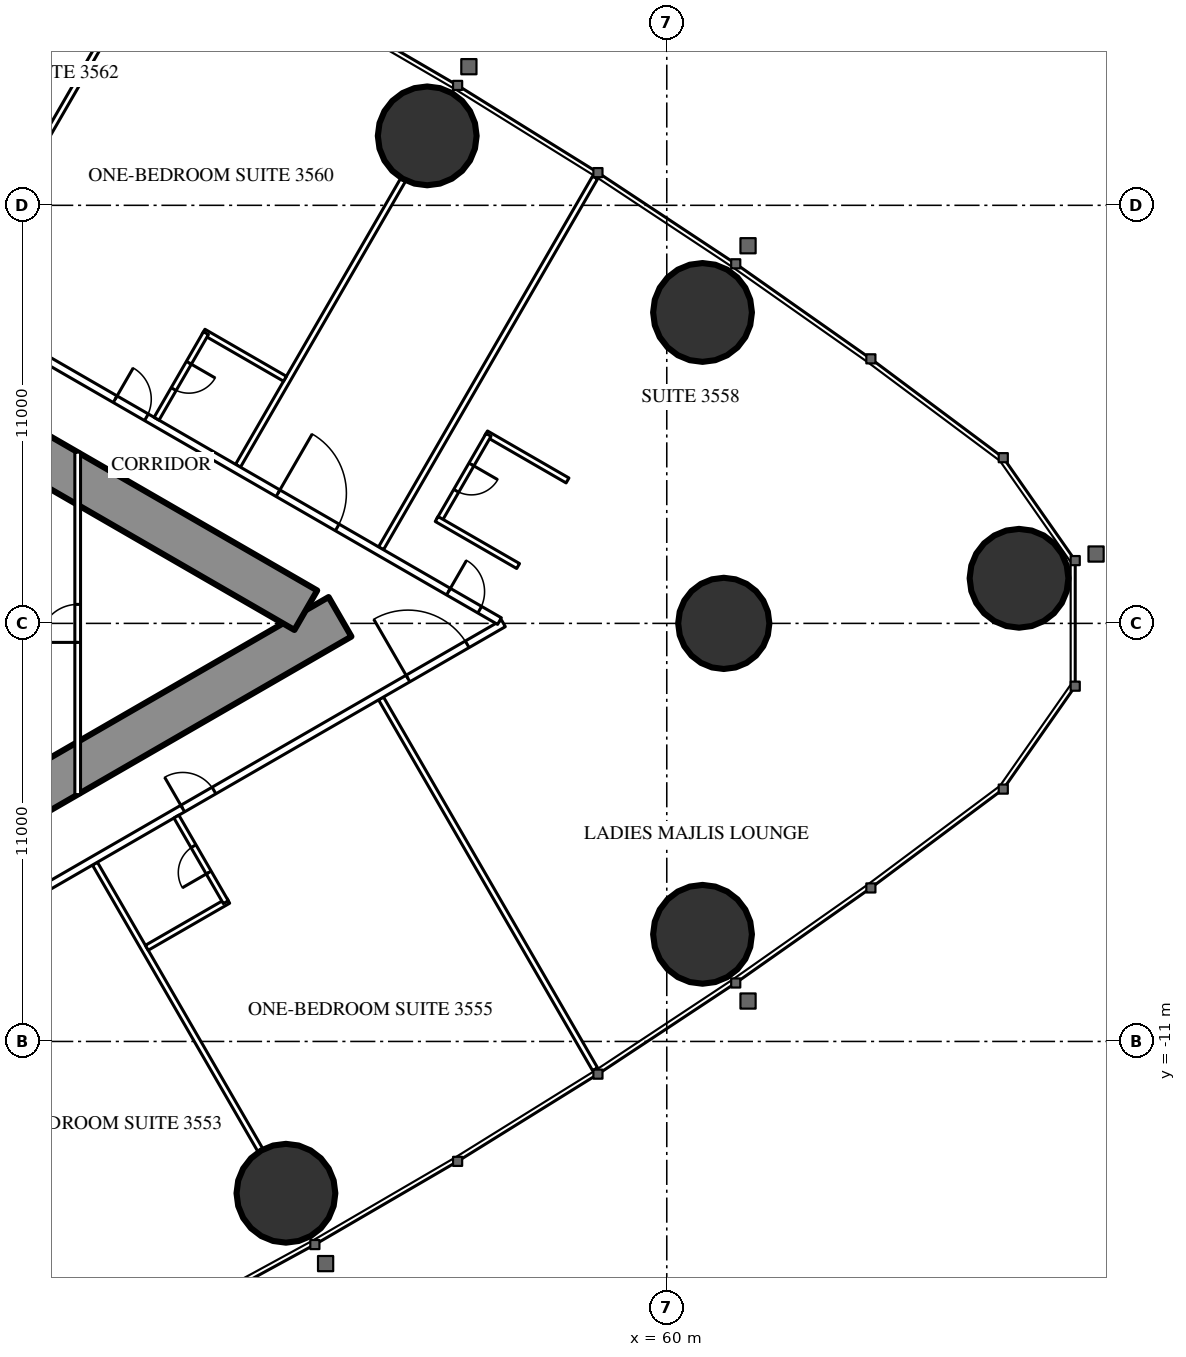
"""IFC4 building model, lengths in metres.
Left out: names, types, materials, properties, quantities, classifications, styles, units other than length and angle.
Written with IfcOpenShell. Run it as: python <this file> out.ifc"""

import sys

from ifc_helpers import new_model, si_unit, direction, frame, frame_2d, origin, origin_2d, place, context, subcontext, project, spatial, rectangle, circle, hollow_circle, extrude, element, fill, save


model = new_model("IFC4")
c1 = context("Model", 3, precision=1e-05, world=origin(), true_north=direction((0.0, 1.0)))
c2 = subcontext(c1, "Body", "Model", "MODEL_VIEW")
j1 = project(units=[si_unit("LENGTHUNIT", "METRE"), si_unit("PLANEANGLEUNIT", "RADIAN")], contexts=[c1])
p1 = place(None, origin())
s1 = spatial("IfcSite", under=j1, at=p1, CompositionType="ELEMENT")
p2 = place(p1, origin())
s2 = spatial("IfcBuilding", under=s1, at=p2, CompositionType="ELEMENT")
p3 = place(p2, frame((0.0, 0.0, 132.6)))
s3 = spatial("IfcBuildingStorey", under=s2, at=p3, CompositionType="ELEMENT", Elevation=132.6)
for number, where, z_axis, x_axis in (
    (1, (69.269, 1.187, 0.0), (0.0, 0.0, 1.0), (1.0, 0.0, 0.0)),
    (2, (60.941, 8.181, 0.0), (0.0, 0.0, 1.0), (1.0, 0.0, 0.0)),
    (3, (53.697, 12.827, 0.0), (0.0, 0.0, 1.0), (1.0, 0.0, 0.0)),
    (4, (49.979, -14.994, 0.0), (0.0, 0.0, 1.0), (1.0, 0.0, 0.0)),
    (5, (60.941, -8.181, 0.0), (0.0, 0.0, 1.0), (1.0, 0.0, 0.0)),
):
    element("IfcColumn", number, at=place(p3, frame(where, z_axis=z_axis, x_axis=x_axis)), inside=s3, PredefinedType="COLUMN", context=c2, shape_type="SweptSolid", body=[
        extrude(hollow_circle(Radius=1.3, WallThickness=0.1, at=origin_2d()), origin(), (0.0, 0.0, 1.0), 3.5),
    ])
p4 = place(p3, frame((61.5, 0.0, 0.0), z_axis=(0.0, 0.0, 1.0), x_axis=(1.0, 0.0, 0.0)))
e6 = element("IfcColumn", 6, at=p4, inside=s3, PredefinedType="COLUMN", context=c2, shape_type="SweptSolid", body=[
    extrude(circle(Radius=1.2, at=origin_2d()), origin(), (0.0, 0.0, 1.0), 3.5),
])
p5 = place(p3, frame((27.2, -13.8, 0.0), z_axis=(0.0, 0.0, 1.0), x_axis=(0.866027159892, 0.499996958321, 0.0)))
e7 = element("IfcWall", 7, at=p5, inside=s3, PredefinedType="SHEAR", context=c2, shape_type="SweptSolid", body=[
    extrude(rectangle(XDim=27.947, YDim=1.2, at=frame_2d((13.973, 0.0))), origin(), (0.0, 0.0, 1.0), 3.5),
])
p6 = place(p5, frame((4.6, 0.0, 0.0)))
e8 = element("IfcOpeningElement", 8, at=p6, cuts=e7, PredefinedType="OPENING", context=c2, shape_type="SweptSolid", body=[
    extrude(rectangle(XDim=1.0, YDim=2.2, at=frame_2d((0.5, 1.1))), frame((0.0, 0.61, 0.0), z_axis=(0.0, -1.0, 0.0), x_axis=(1.0, 0.0, 0.0)), (0.0, 0.0, 1.0), 1.22),
])
p7 = place(p5, frame((13.395, 0.0, 0.0)))
e9 = element("IfcOpeningElement", 9, at=p7, cuts=e7, PredefinedType="OPENING", context=c2, shape_type="SweptSolid", body=[
    extrude(rectangle(XDim=1.8, YDim=2.2, at=frame_2d((0.9, 1.1))), frame((0.0, 0.61, 0.0), z_axis=(0.0, -1.0, 0.0), x_axis=(1.0, 0.0, 0.0)), (0.0, 0.0, 1.0), 1.22),
])
p8 = place(p3, frame((27.2, 13.8, 0.0), z_axis=(0.0, 0.0, 1.0), x_axis=(0.866024515034, -0.500001539357, 0.0)))
e10 = element("IfcWall", 10, at=p8, inside=s3, PredefinedType="SHEAR", context=c2, shape_type="SweptSolid", body=[
    extrude(rectangle(XDim=26.907, YDim=1.2, at=frame_2d((13.454, 0.0))), origin(), (0.0, 0.0, 1.0), 3.5),
])
p9 = place(p8, frame((4.6, 0.0, 0.0)))
e11 = element("IfcOpeningElement", 11, at=p9, cuts=e10, PredefinedType="OPENING", context=c2, shape_type="SweptSolid", body=[
    extrude(rectangle(XDim=1.0, YDim=2.2, at=frame_2d((0.5, 1.1))), frame((0.0, 0.61, 0.0), z_axis=(0.0, -1.0, 0.0), x_axis=(1.0, 0.0, 0.0)), (0.0, 0.0, 1.0), 1.22),
])
p10 = place(p8, frame((13.395, 0.0, 0.0)))
e12 = element("IfcOpeningElement", 12, at=p10, cuts=e10, PredefinedType="OPENING", context=c2, shape_type="SweptSolid", body=[
    extrude(rectangle(XDim=1.8, YDim=2.2, at=frame_2d((0.9, 1.1))), frame((0.0, 0.61, 0.0), z_axis=(0.0, -1.0, 0.0), x_axis=(1.0, 0.0, 0.0)), (0.0, 0.0, 1.0), 1.22),
])
p11 = place(p3, frame((44.954, -6.321, 0.0), z_axis=(0.0, 0.0, 1.0), x_axis=(0.500018676722, -0.866014620505, 0.0)))
e13 = element("IfcWall", 13, at=p11, inside=s3, PredefinedType="PARTITIONING", context=c2, shape_type="SweptSolid", body=[
    extrude(rectangle(XDim=8.704, YDim=0.15, at=frame_2d((4.352, 0.0))), origin(), (0.0, 0.0, 1.0), 2.2),
])
p12 = place(p3, frame((52.481, -1.975, 0.0), z_axis=(0.0, 0.0, 1.0), x_axis=(0.500003867771, -0.866023170714, 0.0)))
e14 = element("IfcWall", 14, at=p12, inside=s3, PredefinedType="PARTITIONING", context=c2, shape_type="SweptSolid", body=[
    extrude(rectangle(XDim=11.265, YDim=0.15, at=frame_2d((5.632, 0.0))), origin(), (0.0, 0.0, 1.0), 3.25),
])
p13 = place(p3, frame((41.19, 8.494, 0.0), z_axis=(0.0, 0.0, 1.0), x_axis=(0.49999258054, 0.866029687369, 0.0)))
e15 = element("IfcWall", 15, at=p13, inside=s3, PredefinedType="PARTITIONING", context=c2, shape_type="SweptSolid", body=[
    extrude(rectangle(XDim=11.318, YDim=0.15, at=frame_2d((5.659, 0.0))), origin(), (0.0, 0.0, 1.0), 3.25),
])
p14 = place(p3, frame((48.719, 4.147, 0.0), z_axis=(0.0, 0.0, 1.0), x_axis=(0.499993328235, 0.866029255696, 0.0)))
e16 = element("IfcWall", 16, at=p14, inside=s3, PredefinedType="PARTITIONING", context=c2, shape_type="SweptSolid", body=[
    extrude(rectangle(XDim=8.686, YDim=0.15, at=frame_2d((4.343, 0.0))), origin(), (0.0, 0.0, 1.0), 2.2),
])
p15 = place(p3, frame((52.481, 1.975, 0.0), z_axis=(0.0, 0.0, 1.0), x_axis=(0.500003867771, 0.866023170714, 0.0)))
e17 = element("IfcWall", 17, at=p15, inside=s3, PredefinedType="PARTITIONING", context=c2, shape_type="SweptSolid", body=[
    extrude(rectangle(XDim=11.265, YDim=0.15, at=frame_2d((5.632, 0.0))), origin(), (0.0, 0.0, 1.0), 3.25),
])
p16 = place(p3, frame((37.96, -10.243, 0.0), z_axis=(0.0, 0.0, 1.0), x_axis=(0.866026429433, 0.499998223521, 0.0)))
e18 = element("IfcWall", 18, at=p16, inside=s3, PredefinedType="PARTITIONING", context=c2, shape_type="SweptSolid", body=[
    extrude(rectangle(XDim=20.487, YDim=0.2, at=frame_2d((10.243, 0.0))), origin(), (0.0, 0.0, 1.0), 3.25),
])
p17 = place(p16, frame((10.743, 0.0, 0.0)))
e19 = element("IfcOpeningElement", 19, at=p17, cuts=e18, PredefinedType="OPENING", context=c2, shape_type="SweptSolid", body=[
    extrude(rectangle(XDim=0.95, YDim=2.2, at=frame_2d((0.475, 1.1))), frame((0.0, 0.11, 0.0), z_axis=(0.0, -1.0, 0.0), x_axis=(1.0, 0.0, 0.0)), (0.0, 0.0, 1.0), 0.22),
])
p18 = place(p16, frame((17.586, 0.0, 0.0)))
e20 = element("IfcOpeningElement", 20, at=p18, cuts=e18, PredefinedType="OPENING", context=c2, shape_type="SweptSolid", body=[
    extrude(rectangle(XDim=1.8, YDim=2.2, at=frame_2d((0.9, 1.1))), frame((0.0, 0.11, 0.0), z_axis=(0.0, -1.0, 0.0), x_axis=(1.0, 0.0, 0.0)), (0.0, 0.0, 1.0), 0.22),
])
p19 = place(p16, frame((0.6, 0.0, 0.0)))
e21 = element("IfcOpeningElement", 21, at=p19, cuts=e18, PredefinedType="OPENING", context=c2, shape_type="SweptSolid", body=[
    extrude(rectangle(XDim=0.95, YDim=2.2, at=frame_2d((0.475, 1.1))), frame((0.0, 0.11, 0.0), z_axis=(0.0, -1.0, 0.0), x_axis=(1.0, 0.0, 0.0)), (0.0, 0.0, 1.0), 0.22),
])
p20 = place(p3, frame((36.834, 10.894, 0.0), z_axis=(0.0, 0.0, 1.0), x_axis=(0.866028157229, -0.499995230863, 0.0)))
e22 = element("IfcWall", 22, at=p20, inside=s3, PredefinedType="PARTITIONING", context=c2, shape_type="SweptSolid", body=[
    extrude(rectangle(XDim=21.667, YDim=0.2, at=frame_2d((10.833, 0.0))), origin(), (0.0, 0.0, 1.0), 3.25),
])
p21 = place(p20, frame((20.117, 0.0, 0.0)))
e23 = element("IfcOpeningElement", 23, at=p21, cuts=e22, PredefinedType="OPENING", context=c2, shape_type="SweptSolid", body=[
    extrude(rectangle(XDim=0.95, YDim=2.2, at=frame_2d((0.475, 1.1))), frame((0.0, 0.11, 0.0), z_axis=(0.0, -1.0, 0.0), x_axis=(1.0, 0.0, 0.0)), (0.0, 0.0, 1.0), 0.22),
])
p22 = place(p20, frame((14.938, 0.0, 0.0)))
e24 = element("IfcOpeningElement", 24, at=p22, cuts=e22, PredefinedType="OPENING", context=c2, shape_type="SweptSolid", body=[
    extrude(rectangle(XDim=1.8, YDim=2.2, at=frame_2d((0.9, 1.1))), frame((0.0, 0.11, 0.0), z_axis=(0.0, -1.0, 0.0), x_axis=(1.0, 0.0, 0.0)), (0.0, 0.0, 1.0), 0.22),
])
p23 = place(p20, frame((9.99, 0.0, 0.0)))
e25 = element("IfcOpeningElement", 25, at=p23, cuts=e22, PredefinedType="OPENING", context=c2, shape_type="SweptSolid", body=[
    extrude(rectangle(XDim=0.95, YDim=2.2, at=frame_2d((0.475, 1.1))), frame((0.0, 0.11, 0.0), z_axis=(0.0, -1.0, 0.0), x_axis=(1.0, 0.0, 0.0)), (0.0, 0.0, 1.0), 0.22),
])
p24 = place(p20, frame((3.35, 0.0, 0.0)))
e26 = element("IfcOpeningElement", 26, at=p24, cuts=e22, PredefinedType="OPENING", context=c2, shape_type="SweptSolid", body=[
    extrude(rectangle(XDim=1.0, YDim=2.2, at=frame_2d((0.5, 1.1))), frame((0.0, 0.11, 0.0), z_axis=(0.0, -1.0, 0.0), x_axis=(1.0, 0.0, 0.0)), (0.0, 0.0, 1.0), 0.22),
])
p25 = place(p3, frame((46.319, -8.535, 0.0), z_axis=(0.0, 0.0, 1.0), x_axis=(0.866006523861, 0.500032699561, 0.0)))
e27 = element("IfcWall", 27, at=p25, inside=s3, PredefinedType="PARTITIONING", context=c2, shape_type="SweptSolid", body=[
    extrude(rectangle(XDim=2.475, YDim=0.15, at=frame_2d((1.237, 0.0))), origin(), (0.0, 0.0, 1.0), 3.25),
])
p26 = place(p3, frame((47.097, -5.084, 0.0), z_axis=(0.0, 0.0, 1.0), x_axis=(0.500006934395, -0.866021400173, 0.0)))
e28 = element("IfcWall", 28, at=p26, inside=s3, PredefinedType="PARTITIONING", context=c2, shape_type="SweptSolid", body=[
    extrude(rectangle(XDim=2.6, YDim=0.15, at=frame_2d((1.3, 0.0))), origin(), (0.0, 0.0, 1.0), 3.25),
])
p27 = place(p26, frame((0.9, 0.0, 0.0)))
e29 = element("IfcOpeningElement", 29, at=p27, cuts=e28, PredefinedType="OPENING", context=c2, shape_type="SweptSolid", body=[
    extrude(rectangle(XDim=0.8, YDim=2.2, at=frame_2d((0.4, 1.1))), frame((0.0, 0.085, 0.0), z_axis=(0.0, -1.0, 0.0), x_axis=(1.0, 0.0, 0.0)), (0.0, 0.0, 1.0), 0.17),
])
p28 = place(p3, frame((55.245, 4.998, 0.0), z_axis=(0.0, 0.0, 1.0), x_axis=(0.866006523861, -0.500032699561, 0.0)))
e30 = element("IfcWall", 30, at=p28, inside=s3, PredefinedType="PARTITIONING", context=c2, shape_type="SweptSolid", body=[
    extrude(rectangle(XDim=2.475, YDim=0.15, at=frame_2d((1.237, 0.0))), origin(), (0.0, 0.0, 1.0), 3.25),
])
p29 = place(p3, frame((54.01, 2.709, 0.0), z_axis=(0.0, 0.0, 1.0), x_axis=(0.500006934395, 0.866021400173, 0.0)))
e31 = element("IfcWall", 31, at=p29, inside=s3, PredefinedType="PARTITIONING", context=c2, shape_type="SweptSolid", body=[
    extrude(rectangle(XDim=2.6, YDim=0.15, at=frame_2d((1.3, 0.0))), origin(), (0.0, 0.0, 1.0), 3.25),
])
p30 = place(p29, frame((0.9, 0.0, 0.0)))
e32 = element("IfcOpeningElement", 32, at=p30, cuts=e31, PredefinedType="OPENING", context=c2, shape_type="SweptSolid", body=[
    extrude(rectangle(XDim=0.8, YDim=2.2, at=frame_2d((0.4, 1.1))), frame((0.0, 0.085, 0.0), z_axis=(0.0, -1.0, 0.0), x_axis=(1.0, 0.0, 0.0)), (0.0, 0.0, 1.0), 0.17),
])
for number, where, z_axis, x_axis in (
    (33, (53.945, 2.747, 0.0), (0.0, 0.0, 1.0), (0.866, -0.5, 0.0)),
    (34, (47.81, 7.674, 0.0), (0.0, 0.0, 1.0), (0.866, -0.5, 0.0)),
):
    element("IfcWall", number, at=place(p3, frame(where, z_axis=z_axis, x_axis=x_axis)), inside=s3, PredefinedType="PARTITIONING", context=c2, shape_type="SweptSolid", body=[
        extrude(rectangle(XDim=2.475, YDim=0.15, at=frame_2d((1.238, 0.0))), origin(), (0.0, 0.0, 1.0), 3.25),
    ])
p31 = place(p3, frame((46.575, 5.385, 0.0), z_axis=(0.0, 0.0, 1.0), x_axis=(0.500006934395, 0.866021400173, 0.0)))
e35 = element("IfcWall", 35, at=p31, inside=s3, PredefinedType="PARTITIONING", context=c2, shape_type="SweptSolid", body=[
    extrude(rectangle(XDim=2.6, YDim=0.15, at=frame_2d((1.3, 0.0))), origin(), (0.0, 0.0, 1.0), 3.25),
])
p32 = place(p31, frame((0.9, 0.0, 0.0)))
e36 = element("IfcOpeningElement", 36, at=p32, cuts=e35, PredefinedType="OPENING", context=c2, shape_type="SweptSolid", body=[
    extrude(rectangle(XDim=0.8, YDim=2.2, at=frame_2d((0.4, 1.1))), frame((0.0, 0.085, 0.0), z_axis=(0.0, -1.0, 0.0), x_axis=(1.0, 0.0, 0.0)), (0.0, 0.0, 1.0), 0.17),
])
p33 = place(p3, frame((44.5, -4.505, 0.0), z_axis=(0.0, 0.0, 1.0), x_axis=(0.0, 1.0, 0.0)))
e37 = element("IfcWall", 37, at=p33, inside=s3, PredefinedType="PARTITIONING", context=c2, shape_type="SweptSolid", body=[
    extrude(rectangle(XDim=9.009, YDim=0.15, at=frame_2d((4.505, 0.0))), origin(), (0.0, 0.0, 1.0), 2.45),
])
p34 = place(p33, frame((4.005, 0.0, 0.0)))
e38 = element("IfcOpeningElement", 38, at=p34, cuts=e37, PredefinedType="OPENING", context=c2, shape_type="SweptSolid", body=[
    extrude(rectangle(XDim=1.0, YDim=2.2, at=frame_2d((0.5, 1.1))), frame((0.0, 0.085, 0.0), z_axis=(0.0, -1.0, 0.0), x_axis=(1.0, 0.0, 0.0)), (0.0, 0.0, 1.0), 0.17),
])
p35 = place(p27, origin())
e39 = element("IfcDoor", 39, at=p35, inside=s3, OperationType="SINGLE_SWING_RIGHT", PredefinedType="DOOR", context=c2, shape_type="SweptSolid", body=[
    extrude(rectangle(XDim=0.8, YDim=2.2, at=frame_2d((0.4, 1.1))), frame((0.0, 0.025, 0.0), z_axis=(0.0, -1.0, 0.0), x_axis=(1.0, 0.0, 0.0)), (0.0, 0.0, 1.0), 0.05),
])
fill(e29, e39)
p36 = place(p17, origin())
e40 = element("IfcDoor", 40, at=p36, inside=s3, OperationType="SINGLE_SWING_LEFT", PredefinedType="DOOR", context=c2, shape_type="SweptSolid", body=[
    extrude(rectangle(XDim=0.95, YDim=2.2, at=frame_2d((0.475, 1.1))), frame((0.0, 0.025, 0.0), z_axis=(0.0, -1.0, 0.0), x_axis=(1.0, 0.0, 0.0)), (0.0, 0.0, 1.0), 0.05),
])
fill(e19, e40)
p37 = place(p18, origin())
e41 = element("IfcDoor", 41, at=p37, inside=s3, OperationType="DOUBLE_DOOR_SINGLE_SWING", PredefinedType="DOOR", context=c2, shape_type="SweptSolid", body=[
    extrude(rectangle(XDim=1.8, YDim=2.2, at=frame_2d((0.9, 1.1))), frame((0.0, 0.025, 0.0), z_axis=(0.0, -1.0, 0.0), x_axis=(1.0, 0.0, 0.0)), (0.0, 0.0, 1.0), 0.05),
])
fill(e20, e41)
p38 = place(p30, origin())
e42 = element("IfcDoor", 42, at=p38, inside=s3, OperationType="SINGLE_SWING_RIGHT", PredefinedType="DOOR", context=c2, shape_type="SweptSolid", body=[
    extrude(rectangle(XDim=0.8, YDim=2.2, at=frame_2d((0.4, 1.1))), frame((0.0, 0.025, 0.0), z_axis=(0.0, -1.0, 0.0), x_axis=(1.0, 0.0, 0.0)), (0.0, 0.0, 1.0), 0.05),
])
fill(e32, e42)
p39 = place(p21, origin())
e43 = element("IfcDoor", 43, at=p39, inside=s3, OperationType="SINGLE_SWING_LEFT", PredefinedType="DOOR", context=c2, shape_type="SweptSolid", body=[
    extrude(rectangle(XDim=0.95, YDim=2.2, at=frame_2d((0.475, 1.1))), frame((0.0, 0.025, 0.0), z_axis=(0.0, -1.0, 0.0), x_axis=(1.0, 0.0, 0.0)), (0.0, 0.0, 1.0), 0.05),
])
fill(e23, e43)
p40 = place(p22, origin())
e44 = element("IfcDoor", 44, at=p40, inside=s3, OperationType="DOUBLE_DOOR_SINGLE_SWING", PredefinedType="DOOR", context=c2, shape_type="SweptSolid", body=[
    extrude(rectangle(XDim=1.8, YDim=2.2, at=frame_2d((0.9, 1.1))), frame((0.0, 0.025, 0.0), z_axis=(0.0, -1.0, 0.0), x_axis=(1.0, 0.0, 0.0)), (0.0, 0.0, 1.0), 0.05),
])
fill(e24, e44)
p41 = place(p32, origin())
e45 = element("IfcDoor", 45, at=p41, inside=s3, OperationType="SINGLE_SWING_RIGHT", PredefinedType="DOOR", context=c2, shape_type="SweptSolid", body=[
    extrude(rectangle(XDim=0.8, YDim=2.2, at=frame_2d((0.4, 1.1))), frame((0.0, 0.025, 0.0), z_axis=(0.0, -1.0, 0.0), x_axis=(1.0, 0.0, 0.0)), (0.0, 0.0, 1.0), 0.05),
])
fill(e36, e45)
p42 = place(p23, origin())
e46 = element("IfcDoor", 46, at=p42, inside=s3, OperationType="SINGLE_SWING_LEFT", PredefinedType="DOOR", context=c2, shape_type="SweptSolid", body=[
    extrude(rectangle(XDim=0.95, YDim=2.2, at=frame_2d((0.475, 1.1))), frame((0.0, 0.025, 0.0), z_axis=(0.0, -1.0, 0.0), x_axis=(1.0, 0.0, 0.0)), (0.0, 0.0, 1.0), 0.05),
])
fill(e25, e46)
p43 = place(p34, origin())
e47 = element("IfcDoor", 47, at=p43, inside=s3, OperationType="SINGLE_SWING_LEFT", PredefinedType="DOOR", context=c2, shape_type="SweptSolid", body=[
    extrude(rectangle(XDim=1.0, YDim=2.2, at=frame_2d((0.5, 1.1))), frame((0.0, 0.025, 0.0), z_axis=(0.0, -1.0, 0.0), x_axis=(1.0, 0.0, 0.0)), (0.0, 0.0, 1.0), 0.05),
])
fill(e38, e47)
save(model, sys.argv[1])
